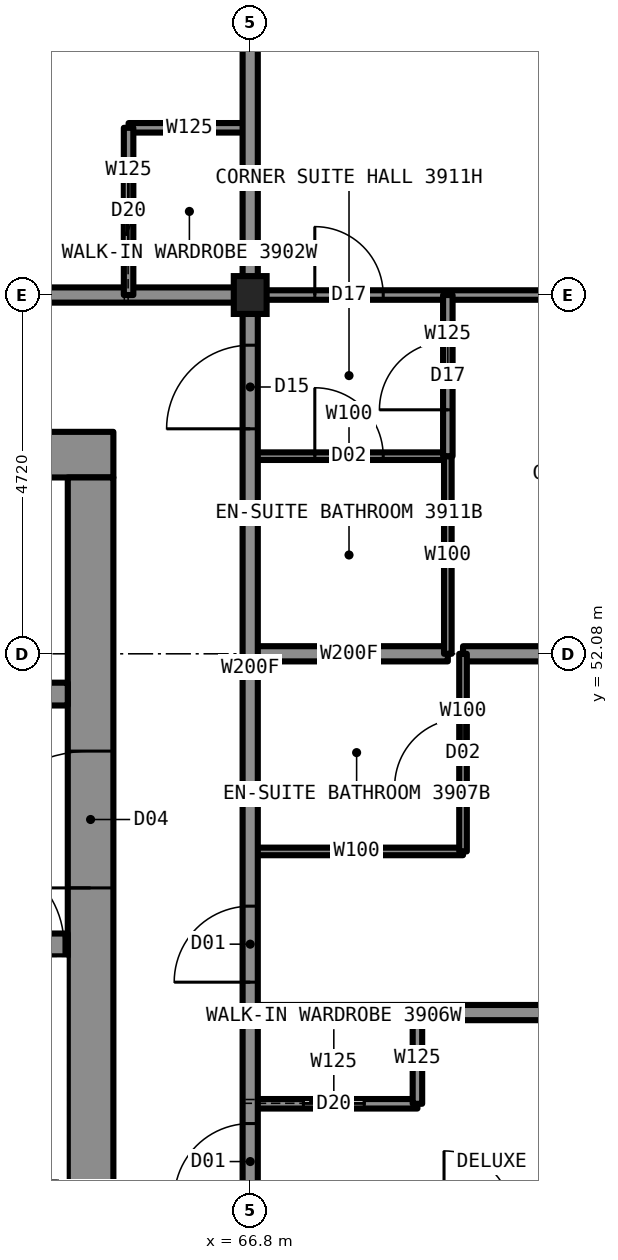
"""IFC4 building model, lengths in metres.
Left out: names, types, materials, properties, quantities, classifications, styles, units other than length and angle.
Written with IfcOpenShell. Run it as: python <this file> out.ifc"""

import sys

from ifc_helpers import new_model, si_unit, direction, frame, frame_2d, origin, origin_2d, place, context, subcontext, project, spatial, rectangle, i_section, extrude, element, fill, save


model = new_model("IFC4")
c1 = context("Model", 3, precision=1e-05, world=origin(), true_north=direction((0.0, 1.0)))
c2 = subcontext(c1, "Body", "Model", "MODEL_VIEW")
j1 = project(units=[si_unit("LENGTHUNIT", "METRE"), si_unit("PLANEANGLEUNIT", "RADIAN")], contexts=[c1])
p1 = place(None, origin())
s1 = spatial("IfcSite", under=j1, at=p1, CompositionType="ELEMENT")
p2 = place(p1, origin())
s2 = spatial("IfcBuilding", under=s1, at=p2, CompositionType="ELEMENT")
p3 = place(p2, frame((0.0, 0.0, 145.9)))
s3 = spatial("IfcBuildingStorey", under=s2, at=p3, CompositionType="ELEMENT", Elevation=145.9)
p4 = place(p3, frame((66.8, 56.8, 0.0), z_axis=(0.0, 0.0, 1.0), x_axis=(1.0, 0.0, 0.0)))
e1 = element("IfcColumn", 1, at=p4, inside=s3, PredefinedType="COLUMN", context=c2, shape_type="SweptSolid", body=[
    extrude(i_section(OverallWidth=0.432, OverallDepth=0.498, WebThickness=0.056, FlangeThickness=0.089, at=origin_2d()), origin(), (0.0, 0.0, 1.0), 3.5),
])
p5 = place(p3, frame((45.0, 54.7, 0.0), z_axis=(0.0, 0.0, 1.0), x_axis=(1.0, 0.0, 0.0)))
e2 = element("IfcWall", 2, at=p5, inside=s3, PredefinedType="SHEAR", context=c2, shape_type="SweptSolid", body=[
    extrude(rectangle(XDim=20.0, YDim=0.6, at=frame_2d((10.0, 0.0))), origin(), (0.0, 0.0, 1.0), 3.5),
])
p6 = place(p3, frame((64.7, 35.6, 0.0), z_axis=(0.0, 0.0, 1.0), x_axis=(0.0, 1.0, 0.0)))
e3 = element("IfcWall", 3, at=p6, inside=s3, PredefinedType="SHEAR", context=c2, shape_type="SweptSolid", body=[
    extrude(rectangle(XDim=18.8, YDim=0.6, at=frame_2d((9.4, 0.0))), origin(), (0.0, 0.0, 1.0), 3.5),
])
p7 = place(p6, frame((13.4, 0.0, 0.0)))
e4 = element("IfcOpeningElement", 4, at=p7, cuts=e3, PredefinedType="OPENING", context=c2, shape_type="SweptSolid", body=[
    extrude(rectangle(XDim=1.8, YDim=2.2, at=frame_2d((0.9, 1.1))), frame((0.0, 0.31, 0.0), z_axis=(0.0, -1.0, 0.0), x_axis=(1.0, 0.0, 0.0)), (0.0, 0.0, 1.0), 0.62),
])
p8 = place(p6, frame((3.6, 0.0, 0.0)))
e5 = element("IfcOpeningElement", 5, at=p8, cuts=e3, PredefinedType="OPENING", context=c2, shape_type="SweptSolid", body=[
    extrude(rectangle(XDim=1.8, YDim=2.2, at=frame_2d((0.9, 1.1))), frame((0.0, 0.31, 0.0), z_axis=(0.0, -1.0, 0.0), x_axis=(1.0, 0.0, 0.0)), (0.0, 0.0, 1.0), 0.62),
])
p9 = place(p3, frame((45.6, 51.55, 0.0), z_axis=(0.0, 0.0, 1.0), x_axis=(1.0, 0.0, 0.0)))
e6 = element("IfcWall", 6, at=p9, inside=s3, PredefinedType="SHEAR", context=c2, shape_type="SweptSolid", body=[
    extrude(rectangle(XDim=18.8, YDim=0.3, at=frame_2d((9.4, 0.0))), origin(), (0.0, 0.0, 1.0), 3.5),
])
p10 = place(p9, frame((0.7, 0.0, 0.0)))
e7 = element("IfcOpeningElement", 7, at=p10, cuts=e6, PredefinedType="OPENING", context=c2, shape_type="SweptSolid", body=[
    extrude(rectangle(XDim=1.1, YDim=2.2, at=frame_2d((0.55, 1.1))), frame((0.0, 0.16, 0.0), z_axis=(0.0, -1.0, 0.0), x_axis=(1.0, 0.0, 0.0)), (0.0, 0.0, 1.0), 0.32),
])
p11 = place(p9, frame((3.4, 0.0, 0.0)))
e8 = element("IfcOpeningElement", 8, at=p11, cuts=e6, PredefinedType="OPENING", context=c2, shape_type="SweptSolid", body=[
    extrude(rectangle(XDim=1.1, YDim=2.2, at=frame_2d((0.55, 1.1))), frame((0.0, 0.16, 0.0), z_axis=(0.0, -1.0, 0.0), x_axis=(1.0, 0.0, 0.0)), (0.0, 0.0, 1.0), 0.32),
])
p12 = place(p9, frame((6.1, 0.0, 0.0)))
e9 = element("IfcOpeningElement", 9, at=p12, cuts=e6, PredefinedType="OPENING", context=c2, shape_type="SweptSolid", body=[
    extrude(rectangle(XDim=1.1, YDim=2.2, at=frame_2d((0.55, 1.1))), frame((0.0, 0.16, 0.0), z_axis=(0.0, -1.0, 0.0), x_axis=(1.0, 0.0, 0.0)), (0.0, 0.0, 1.0), 0.32),
])
p13 = place(p9, frame((8.8, 0.0, 0.0)))
e10 = element("IfcOpeningElement", 10, at=p13, cuts=e6, PredefinedType="OPENING", context=c2, shape_type="SweptSolid", body=[
    extrude(rectangle(XDim=1.1, YDim=2.2, at=frame_2d((0.55, 1.1))), frame((0.0, 0.16, 0.0), z_axis=(0.0, -1.0, 0.0), x_axis=(1.0, 0.0, 0.0)), (0.0, 0.0, 1.0), 0.32),
])
p14 = place(p9, frame((11.6, 0.0, 0.0)))
e11 = element("IfcOpeningElement", 11, at=p14, cuts=e6, PredefinedType="OPENING", context=c2, shape_type="SweptSolid", body=[
    extrude(rectangle(XDim=1.1, YDim=2.2, at=frame_2d((0.55, 1.1))), frame((0.0, 0.16, 0.0), z_axis=(0.0, -1.0, 0.0), x_axis=(1.0, 0.0, 0.0)), (0.0, 0.0, 1.0), 0.32),
])
p15 = place(p9, frame((14.3, 0.0, 0.0)))
e12 = element("IfcOpeningElement", 12, at=p15, cuts=e6, PredefinedType="OPENING", context=c2, shape_type="SweptSolid", body=[
    extrude(rectangle(XDim=1.1, YDim=2.2, at=frame_2d((0.55, 1.1))), frame((0.0, 0.16, 0.0), z_axis=(0.0, -1.0, 0.0), x_axis=(1.0, 0.0, 0.0)), (0.0, 0.0, 1.0), 0.32),
])
p16 = place(p3, frame((56.2, 48.25, 0.0), z_axis=(0.0, 0.0, 1.0), x_axis=(1.0, 0.0, 0.0)))
e13 = element("IfcWall", 13, at=p16, inside=s3, PredefinedType="SHEAR", context=c2, shape_type="SweptSolid", body=[
    extrude(rectangle(XDim=8.2, YDim=0.3, at=frame_2d((4.1, 0.0))), origin(), (0.0, 0.0, 1.0), 3.5),
])
p17 = place(p16, frame((6.95, 0.0, 0.0)))
e14 = element("IfcOpeningElement", 14, at=p17, cuts=e13, PredefinedType="OPENING", context=c2, shape_type="SweptSolid", body=[
    extrude(rectangle(XDim=1.2, YDim=2.2, at=frame_2d((0.6, 1.1))), frame((0.0, 0.16, 0.0), z_axis=(0.0, -1.0, 0.0), x_axis=(1.0, 0.0, 0.0)), (0.0, 0.0, 1.0), 0.32),
])
p18 = place(p3, frame((66.8, 46.16, 0.0), z_axis=(0.0, 0.0, 1.0), x_axis=(1.0, 0.0, 0.0)))
e15 = element("IfcWall", 15, at=p18, inside=s3, PredefinedType="PARTITIONING", context=c2, shape_type="SweptSolid", body=[
    extrude(rectangle(XDim=2.2, YDim=0.125, at=frame_2d((1.1, 0.0))), origin(), (0.0, 0.0, 1.0), 3.33),
])
p19 = place(p18, frame((0.7, 0.0, 0.0)))
e16 = element("IfcOpeningElement", 16, at=p19, cuts=e15, PredefinedType="OPENING", context=c2, shape_type="SweptSolid", body=[
    extrude(rectangle(XDim=0.8, YDim=2.1, at=frame_2d((0.4, 1.05))), frame((0.0, 0.073, 0.0), z_axis=(0.0, -1.0, 0.0), x_axis=(1.0, 0.0, 0.0)), (0.0, 0.0, 1.0), 0.145),
])
p20 = place(p3, frame((43.2, 56.8, 0.0), z_axis=(0.0, 0.0, 1.0), x_axis=(1.0, 0.0, 0.0)))
e17 = element("IfcWall", 17, at=p20, inside=s3, PredefinedType="PARTITIONING", context=c2, shape_type="SweptSolid", body=[
    extrude(rectangle(XDim=23.6, YDim=0.2, at=frame_2d((11.8, 0.0))), origin(), (0.0, 0.0, 1.0), 3.33),
])
p21 = place(p20, frame((1.85, 0.0, 0.0)))
e18 = element("IfcOpeningElement", 18, at=p21, cuts=e17, PredefinedType="OPENING", context=c2, shape_type="SweptSolid", body=[
    extrude(rectangle(XDim=1.1, YDim=2.2, at=frame_2d((0.55, 1.1))), frame((0.0, 0.11, 0.0), z_axis=(0.0, -1.0, 0.0), x_axis=(1.0, 0.0, 0.0)), (0.0, 0.0, 1.0), 0.22),
])
p22 = place(p20, frame((17.16, 0.0, 0.0)))
e19 = element("IfcOpeningElement", 19, at=p22, cuts=e17, PredefinedType="OPENING", context=c2, shape_type="SweptSolid", body=[
    extrude(rectangle(XDim=1.0, YDim=2.2, at=frame_2d((0.5, 1.1))), frame((0.0, 0.11, 0.0), z_axis=(0.0, -1.0, 0.0), x_axis=(1.0, 0.0, 0.0)), (0.0, 0.0, 1.0), 0.22),
])
p23 = place(p3, frame((66.8, 56.8, 0.0), z_axis=(0.0, 0.0, 1.0), x_axis=(1.0, 0.0, 0.0)))
e20 = element("IfcWall", 20, at=p23, inside=s3, PredefinedType="PARTITIONING", context=c2, shape_type="SweptSolid", body=[
    extrude(rectangle(XDim=8.5, YDim=0.125, at=frame_2d((4.25, 0.0))), origin(), (0.0, 0.0, 1.0), 2.573),
])
p24 = place(p23, frame((0.85, 0.0, 0.0)))
e21 = element("IfcOpeningElement", 21, at=p24, cuts=e20, PredefinedType="OPENING", context=c2, shape_type="SweptSolid", body=[
    extrude(rectangle(XDim=0.9, YDim=2.2, at=frame_2d((0.45, 1.1))), frame((0.0, 0.073, 0.0), z_axis=(0.0, -1.0, 0.0), x_axis=(1.0, 0.0, 0.0)), (0.0, 0.0, 1.0), 0.145),
])
p25 = place(p3, frame((65.2, 59.0, 0.0), z_axis=(0.0, 0.0, 1.0), x_axis=(1.0, 0.0, 0.0)))
e22 = element("IfcWall", 22, at=p25, inside=s3, PredefinedType="PARTITIONING", context=c2, shape_type="SweptSolid", body=[
    extrude(rectangle(XDim=1.6, YDim=0.125, at=frame_2d((0.8, 0.0))), origin(), (0.0, 0.0, 1.0), 3.33),
])
p26 = place(p3, frame((66.8, 47.36, 0.0), z_axis=(0.0, 0.0, 1.0), x_axis=(1.0, 0.0, 0.0)))
e23 = element("IfcWall", 23, at=p26, inside=s3, PredefinedType="PARTITIONING", context=c2, shape_type="SweptSolid", body=[
    extrude(rectangle(XDim=8.5, YDim=0.2, at=frame_2d((4.25, 0.0))), origin(), (0.0, 0.0, 1.0), 2.731),
])
p27 = place(p3, frame((66.8, 49.48, 0.0), z_axis=(0.0, 0.0, 1.0), x_axis=(1.0, 0.0, 0.0)))
e24 = element("IfcWall", 24, at=p27, inside=s3, PredefinedType="PARTITIONING", context=c2, shape_type="SweptSolid", body=[
    extrude(rectangle(XDim=2.8, YDim=0.1, at=frame_2d((1.4, 0.0))), origin(), (0.0, 0.0, 1.0), 3.33),
])
p28 = place(p3, frame((66.8, 52.08, 0.0), z_axis=(0.0, 0.0, 1.0), x_axis=(1.0, 0.0, 0.0)))
e25 = element("IfcWall", 25, at=p28, inside=s3, PredefinedType="PARTITIONING", context=c2, shape_type="SweptSolid", body=[
    extrude(rectangle(XDim=2.6, YDim=0.2, at=frame_2d((1.3, 0.0))), origin(), (0.0, 0.0, 1.0), 2.573),
])
p29 = place(p3, frame((69.6, 52.08, 0.0), z_axis=(0.0, 0.0, 1.0), x_axis=(1.0, 0.0, 0.0)))
e26 = element("IfcWall", 26, at=p29, inside=s3, PredefinedType="PARTITIONING", context=c2, shape_type="SweptSolid", body=[
    extrude(rectangle(XDim=5.7, YDim=0.2, at=frame_2d((2.85, 0.0))), origin(), (0.0, 0.0, 1.0), 2.573),
])
p30 = place(p3, frame((66.8, 54.68, 0.0), z_axis=(0.0, 0.0, 1.0), x_axis=(1.0, 0.0, 0.0)))
e27 = element("IfcWall", 27, at=p30, inside=s3, PredefinedType="PARTITIONING", context=c2, shape_type="SweptSolid", body=[
    extrude(rectangle(XDim=2.6, YDim=0.1, at=frame_2d((1.3, 0.0))), origin(), (0.0, 0.0, 1.0), 3.33),
])
p31 = place(p30, frame((0.85, 0.0, 0.0)))
e28 = element("IfcOpeningElement", 28, at=p31, cuts=e27, PredefinedType="OPENING", context=c2, shape_type="SweptSolid", body=[
    extrude(rectangle(XDim=0.9, YDim=2.1, at=frame_2d((0.45, 1.05))), frame((0.0, 0.06, 0.0), z_axis=(0.0, -1.0, 0.0), x_axis=(1.0, 0.0, 0.0)), (0.0, 0.0, 1.0), 0.12),
])
p32 = place(p3, frame((65.2, 56.8, 0.0), z_axis=(0.0, 0.0, 1.0), x_axis=(0.0, 1.0, 0.0)))
e29 = element("IfcWall", 29, at=p32, inside=s3, PredefinedType="PARTITIONING", context=c2, shape_type="SweptSolid", body=[
    extrude(rectangle(XDim=2.2, YDim=0.125, at=frame_2d((1.1, 0.0))), origin(), (0.0, 0.0, 1.0), 3.33),
])
p33 = place(p32, frame((0.7, 0.0, 0.0)))
e30 = element("IfcOpeningElement", 30, at=p33, cuts=e29, PredefinedType="OPENING", context=c2, shape_type="SweptSolid", body=[
    extrude(rectangle(XDim=0.8, YDim=2.1, at=frame_2d((0.4, 1.05))), frame((0.0, 0.073, 0.0), z_axis=(0.0, -1.0, 0.0), x_axis=(1.0, 0.0, 0.0)), (0.0, 0.0, 1.0), 0.145),
])
p34 = place(p3, frame((66.8, 33.2, 0.0), z_axis=(0.0, 0.0, 1.0), x_axis=(0.0, 1.0, 0.0)))
e31 = element("IfcWall", 31, at=p34, inside=s3, PredefinedType="PARTITIONING", context=c2, shape_type="SweptSolid", body=[
    extrude(rectangle(XDim=23.6, YDim=0.2, at=frame_2d((11.8, 0.0))), origin(), (0.0, 0.0, 1.0), 3.33),
])
p35 = place(p34, frame((7.87, 0.0, 0.0)))
e32 = element("IfcOpeningElement", 32, at=p35, cuts=e31, PredefinedType="OPENING", context=c2, shape_type="SweptSolid", body=[
    extrude(rectangle(XDim=1.0, YDim=2.2, at=frame_2d((0.5, 1.1))), frame((0.0, 0.11, 0.0), z_axis=(0.0, -1.0, 0.0), x_axis=(1.0, 0.0, 0.0)), (0.0, 0.0, 1.0), 0.22),
])
p36 = place(p34, frame((11.7, 0.0, 0.0)))
e33 = element("IfcOpeningElement", 33, at=p36, cuts=e31, PredefinedType="OPENING", context=c2, shape_type="SweptSolid", body=[
    extrude(rectangle(XDim=1.0, YDim=2.2, at=frame_2d((0.5, 1.1))), frame((0.0, 0.11, 0.0), z_axis=(0.0, -1.0, 0.0), x_axis=(1.0, 0.0, 0.0)), (0.0, 0.0, 1.0), 0.22),
])
p37 = place(p34, frame((14.56, 0.0, 0.0)))
e34 = element("IfcOpeningElement", 34, at=p37, cuts=e31, PredefinedType="OPENING", context=c2, shape_type="SweptSolid", body=[
    extrude(rectangle(XDim=1.0, YDim=2.2, at=frame_2d((0.5, 1.1))), frame((0.0, 0.11, 0.0), z_axis=(0.0, -1.0, 0.0), x_axis=(1.0, 0.0, 0.0)), (0.0, 0.0, 1.0), 0.22),
])
p38 = place(p34, frame((21.84, 0.0, 0.0)))
e35 = element("IfcOpeningElement", 35, at=p38, cuts=e31, PredefinedType="OPENING", context=c2, shape_type="SweptSolid", body=[
    extrude(rectangle(XDim=1.1, YDim=2.2, at=frame_2d((0.55, 1.1))), frame((0.0, 0.11, 0.0), z_axis=(0.0, -1.0, 0.0), x_axis=(1.0, 0.0, 0.0)), (0.0, 0.0, 1.0), 0.22),
])
p39 = place(p34, frame((0.66, 0.0, 0.0)))
e36 = element("IfcOpeningElement", 36, at=p39, cuts=e31, PredefinedType="OPENING", context=c2, shape_type="SweptSolid", body=[
    extrude(rectangle(XDim=1.1, YDim=2.2, at=frame_2d((0.55, 1.1))), frame((0.0, 0.11, 0.0), z_axis=(0.0, -1.0, 0.0), x_axis=(1.0, 0.0, 0.0)), (0.0, 0.0, 1.0), 0.22),
])
p40 = place(p3, frame((66.8, 56.8, 0.0), z_axis=(0.0, 0.0, 1.0), x_axis=(0.0, 1.0, 0.0)))
e37 = element("IfcWall", 37, at=p40, inside=s3, PredefinedType="PARTITIONING", context=c2, shape_type="SweptSolid", body=[
    extrude(rectangle(XDim=8.5, YDim=0.2, at=frame_2d((4.25, 0.0))), origin(), (0.0, 0.0, 1.0), 2.573),
])
p41 = place(p3, frame((69.0, 46.16, 0.0), z_axis=(0.0, 0.0, 1.0), x_axis=(0.0, 1.0, 0.0)))
e38 = element("IfcWall", 38, at=p41, inside=s3, PredefinedType="PARTITIONING", context=c2, shape_type="SweptSolid", body=[
    extrude(rectangle(XDim=1.2, YDim=0.125, at=frame_2d((0.6, 0.0))), origin(), (0.0, 0.0, 1.0), 3.33),
])
p42 = place(p3, frame((69.4, 52.08, 0.0), z_axis=(0.0, 0.0, 1.0), x_axis=(0.0, 1.0, 0.0)))
e39 = element("IfcWall", 39, at=p42, inside=s3, PredefinedType="PARTITIONING", context=c2, shape_type="SweptSolid", body=[
    extrude(rectangle(XDim=2.6, YDim=0.1, at=frame_2d((1.3, 0.0))), origin(), (0.0, 0.0, 1.0), 3.33),
])
p43 = place(p3, frame((69.4, 54.68, 0.0), z_axis=(0.0, 0.0, 1.0), x_axis=(0.0, 1.0, 0.0)))
e40 = element("IfcWall", 40, at=p43, inside=s3, PredefinedType="PARTITIONING", context=c2, shape_type="SweptSolid", body=[
    extrude(rectangle(XDim=2.12, YDim=0.125, at=frame_2d((1.06, 0.0))), origin(), (0.0, 0.0, 1.0), 3.33),
])
p44 = place(p43, frame((0.61, 0.0, 0.0)))
e41 = element("IfcOpeningElement", 41, at=p44, cuts=e40, PredefinedType="OPENING", context=c2, shape_type="SweptSolid", body=[
    extrude(rectangle(XDim=0.9, YDim=2.2, at=frame_2d((0.45, 1.1))), frame((0.0, 0.073, 0.0), z_axis=(0.0, -1.0, 0.0), x_axis=(1.0, 0.0, 0.0)), (0.0, 0.0, 1.0), 0.145),
])
p45 = place(p3, frame((69.6, 49.48, 0.0), z_axis=(0.0, 0.0, 1.0), x_axis=(0.0, 1.0, 0.0)))
e42 = element("IfcWall", 42, at=p45, inside=s3, PredefinedType="PARTITIONING", context=c2, shape_type="SweptSolid", body=[
    extrude(rectangle(XDim=2.6, YDim=0.1, at=frame_2d((1.3, 0.0))), origin(), (0.0, 0.0, 1.0), 3.33),
])
p46 = place(p45, frame((0.85, 0.0, 0.0)))
e43 = element("IfcOpeningElement", 43, at=p46, cuts=e42, PredefinedType="OPENING", context=c2, shape_type="SweptSolid", body=[
    extrude(rectangle(XDim=0.9, YDim=2.1, at=frame_2d((0.45, 1.05))), frame((0.0, 0.06, 0.0), z_axis=(0.0, -1.0, 0.0), x_axis=(1.0, 0.0, 0.0)), (0.0, 0.0, 1.0), 0.12),
])
p47 = place(p33, origin())
e44 = element("IfcDoor", 44, at=p47, inside=s3, OperationType="SLIDING_TO_LEFT", PredefinedType="DOOR", context=c2, shape_type="SweptSolid", body=[
    extrude(rectangle(XDim=0.8, YDim=2.1, at=frame_2d((0.4, 1.05))), frame((0.0, 0.025, 0.0), z_axis=(0.0, -1.0, 0.0), x_axis=(1.0, 0.0, 0.0)), (0.0, 0.0, 1.0), 0.05),
])
fill(e30, e44)
p48 = place(p36, origin())
e45 = element("IfcDoor", 45, at=p48, inside=s3, OperationType="SINGLE_SWING_LEFT", PredefinedType="DOOR", context=c2, shape_type="SweptSolid", body=[
    extrude(rectangle(XDim=1.0, YDim=2.2, at=frame_2d((0.5, 1.1))), frame((0.0, 0.025, 0.0), z_axis=(0.0, -1.0, 0.0), x_axis=(1.0, 0.0, 0.0)), (0.0, 0.0, 1.0), 0.05),
])
fill(e33, e45)
p49 = place(p19, origin())
e46 = element("IfcDoor", 46, at=p49, inside=s3, OperationType="SLIDING_TO_LEFT", PredefinedType="DOOR", context=c2, shape_type="SweptSolid", body=[
    extrude(rectangle(XDim=0.8, YDim=2.1, at=frame_2d((0.4, 1.05))), frame((0.0, 0.025, 0.0), z_axis=(0.0, -1.0, 0.0), x_axis=(1.0, 0.0, 0.0)), (0.0, 0.0, 1.0), 0.05),
])
fill(e16, e46)
p50 = place(p37, origin())
e47 = element("IfcDoor", 47, at=p50, inside=s3, OperationType="SINGLE_SWING_LEFT", PredefinedType="DOOR", context=c2, shape_type="SweptSolid", body=[
    extrude(rectangle(XDim=1.0, YDim=2.2, at=frame_2d((0.5, 1.1))), frame((0.0, 0.025, 0.0), z_axis=(0.0, -1.0, 0.0), x_axis=(1.0, 0.0, 0.0)), (0.0, 0.0, 1.0), 0.05),
])
fill(e34, e47)
p51 = place(p46, origin())
e48 = element("IfcDoor", 48, at=p51, inside=s3, OperationType="SINGLE_SWING_RIGHT", PredefinedType="DOOR", context=c2, shape_type="SweptSolid", body=[
    extrude(rectangle(XDim=0.9, YDim=2.1, at=frame_2d((0.45, 1.05))), frame((0.0, 0.025, 0.0), z_axis=(0.0, -1.0, 0.0), x_axis=(1.0, 0.0, 0.0)), (0.0, 0.0, 1.0), 0.05),
])
fill(e43, e48)
p52 = place(p24, origin())
e49 = element("IfcDoor", 49, at=p52, inside=s3, OperationType="SINGLE_SWING_LEFT", PredefinedType="DOOR", context=c2, shape_type="SweptSolid", body=[
    extrude(rectangle(XDim=0.9, YDim=2.2, at=frame_2d((0.45, 1.1))), frame((0.0, 0.025, 0.0), z_axis=(0.0, -1.0, 0.0), x_axis=(1.0, 0.0, 0.0)), (0.0, 0.0, 1.0), 0.05),
])
fill(e21, e49)
p53 = place(p31, origin())
e50 = element("IfcDoor", 50, at=p53, inside=s3, OperationType="SINGLE_SWING_RIGHT", PredefinedType="DOOR", context=c2, shape_type="SweptSolid", body=[
    extrude(rectangle(XDim=0.9, YDim=2.1, at=frame_2d((0.45, 1.05))), frame((0.0, 0.025, 0.0), z_axis=(0.0, -1.0, 0.0), x_axis=(1.0, 0.0, 0.0)), (0.0, 0.0, 1.0), 0.05),
])
fill(e28, e50)
p54 = place(p38, origin())
e51 = element("IfcDoor", 51, at=p54, inside=s3, OperationType="SINGLE_SWING_LEFT", PredefinedType="DOOR", context=c2, shape_type="SweptSolid", body=[
    extrude(rectangle(XDim=1.1, YDim=2.2, at=frame_2d((0.55, 1.1))), frame((0.0, 0.025, 0.0), z_axis=(0.0, -1.0, 0.0), x_axis=(1.0, 0.0, 0.0)), (0.0, 0.0, 1.0), 0.05),
])
fill(e35, e51)
p55 = place(p44, origin())
e52 = element("IfcDoor", 52, at=p55, inside=s3, OperationType="SINGLE_SWING_LEFT", PredefinedType="DOOR", context=c2, shape_type="SweptSolid", body=[
    extrude(rectangle(XDim=0.9, YDim=2.2, at=frame_2d((0.45, 1.1))), frame((0.0, 0.025, 0.0), z_axis=(0.0, -1.0, 0.0), x_axis=(1.0, 0.0, 0.0)), (0.0, 0.0, 1.0), 0.05),
])
fill(e41, e52)
p56 = place(p7, origin())
e53 = element("IfcDoor", 53, at=p56, inside=s3, OperationType="DOUBLE_DOOR_SINGLE_SWING", PredefinedType="DOOR", context=c2, shape_type="SweptSolid", body=[
    extrude(rectangle(XDim=1.8, YDim=2.2, at=frame_2d((0.9, 1.1))), frame((0.0, 0.025, 0.0), z_axis=(0.0, -1.0, 0.0), x_axis=(1.0, 0.0, 0.0)), (0.0, 0.0, 1.0), 0.05),
])
fill(e4, e53)
p57 = place(p17, origin())
e54 = element("IfcDoor", 54, at=p57, inside=s3, OperationType="SINGLE_SWING_LEFT", PredefinedType="DOOR", context=c2, shape_type="SweptSolid", body=[
    extrude(rectangle(XDim=1.2, YDim=2.2, at=frame_2d((0.6, 1.1))), frame((0.0, 0.025, 0.0), z_axis=(0.0, -1.0, 0.0), x_axis=(1.0, 0.0, 0.0)), (0.0, 0.0, 1.0), 0.05),
])
fill(e14, e54)
save(model, sys.argv[1])
